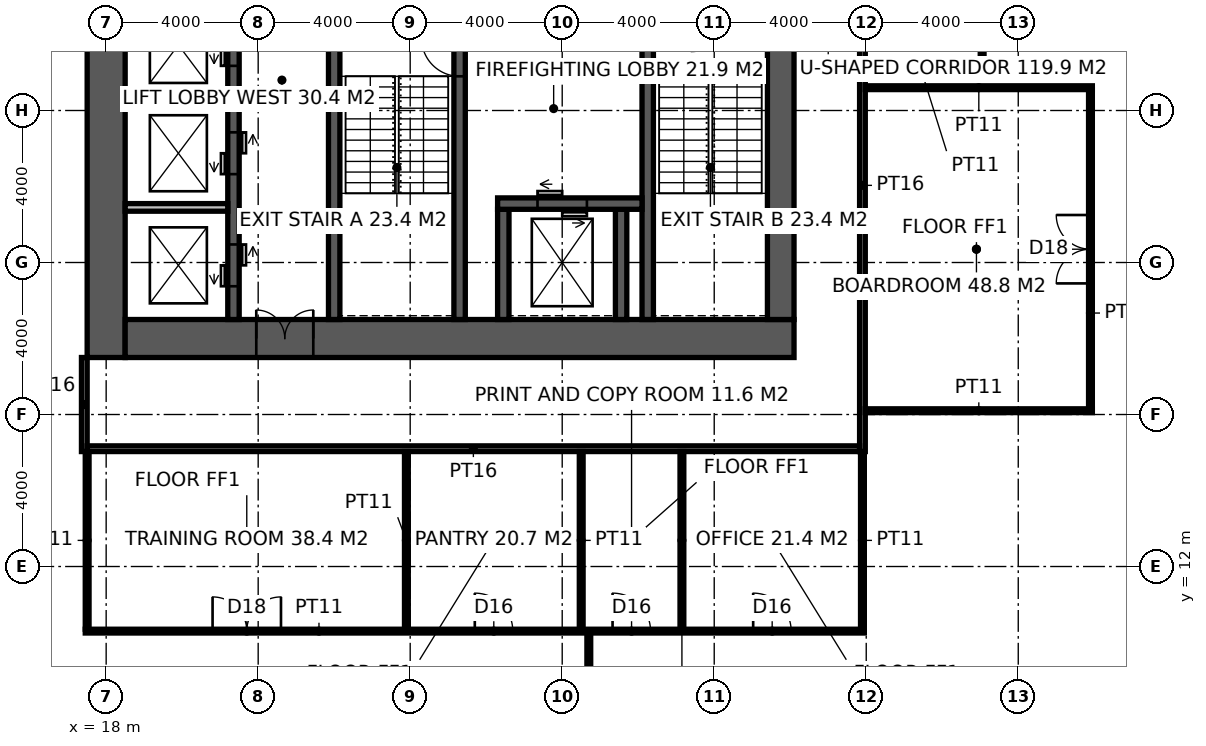
"""IFC4 building model, lengths in metres.
Left out: names, types, materials, properties, quantities, classifications, styles, units other than length and angle.
Written with IfcOpenShell. Run it as: python <this file> out.ifc"""

import sys

from ifc_helpers import new_model, si_unit, direction, frame, frame_2d, origin, place, context, subcontext, project, spatial, rectangle, extrude, element, fill, save


model = new_model("IFC4")
c1 = context("Model", 3, precision=1e-05, world=origin(), true_north=direction((0.0, 1.0)))
c2 = subcontext(c1, "Body", "Model", "MODEL_VIEW")
j1 = project(units=[si_unit("LENGTHUNIT", "METRE"), si_unit("PLANEANGLEUNIT", "RADIAN")], contexts=[c1])
p1 = place(None, origin())
s1 = spatial("IfcSite", under=j1, at=p1, CompositionType="ELEMENT")
p2 = place(p1, origin())
s2 = spatial("IfcBuilding", under=s1, at=p2, CompositionType="ELEMENT")
p3 = place(p2, frame((0.0, 0.0, 113.4)))
s3 = spatial("IfcBuildingStorey", under=s2, at=p3, CompositionType="ELEMENT", Elevation=113.4)
p4 = place(p3, frame((18.0, 17.5, -0.15), z_axis=(0.0, 0.0, 1.0), x_axis=(0.0, 1.0, 0.0)))
e1 = element("IfcWall", 1, at=p4, inside=s3, PredefinedType="SHEAR", context=c2, shape_type="SweptSolid", body=[
    extrude(rectangle(XDim=19.0, YDim=1.0, at=frame_2d((9.5, 0.0))), origin(), (0.0, 0.0, 1.0), 4.0),
])
p5 = place(p3, frame((18.5, 18.0, -0.15), z_axis=(0.0, 0.0, 1.0), x_axis=(1.0, 0.0, 0.0)))
e2 = element("IfcWall", 2, at=p5, inside=s3, PredefinedType="SHEAR", context=c2, shape_type="SweptSolid", body=[
    extrude(rectangle(XDim=17.6, YDim=1.0, at=frame_2d((8.8, 0.0))), origin(), (0.0, 0.0, 1.0), 4.0),
])
p6 = place(p5, frame((3.45, 0.0, 0.15)))
e3 = element("IfcOpeningElement", 3, at=p6, cuts=e2, PredefinedType="OPENING", context=c2, shape_type="SweptSolid", body=[
    extrude(rectangle(XDim=1.5, YDim=2.4, at=frame_2d((0.75, 1.2))), frame((0.0, 0.51, 0.0), z_axis=(0.0, -1.0, 0.0), x_axis=(1.0, 0.0, 0.0)), (0.0, 0.0, 1.0), 1.02),
])
p7 = place(p3, frame((35.75, 18.5, -0.15), z_axis=(0.0, 0.0, 1.0), x_axis=(0.0, 1.0, 0.0)))
e4 = element("IfcWall", 4, at=p7, inside=s3, PredefinedType="SHEAR", context=c2, shape_type="SweptSolid", body=[
    extrude(rectangle(XDim=17.0, YDim=0.7, at=frame_2d((8.5, 0.0))), origin(), (0.0, 0.0, 1.0), 4.0),
])
p8 = place(p7, frame((9.85, 0.0, 0.15)))
e5 = element("IfcOpeningElement", 5, at=p8, cuts=e4, PredefinedType="OPENING", context=c2, shape_type="SweptSolid", body=[
    extrude(rectangle(XDim=1.0, YDim=2.2, at=frame_2d((0.5, 1.1))), frame((0.0, 0.36, 0.0), z_axis=(0.0, -1.0, 0.0), x_axis=(1.0, 0.0, 0.0)), (0.0, 0.0, 1.0), 0.72),
])
p9 = place(p3, frame((24.0, 18.5, -0.15), z_axis=(0.0, 0.0, 1.0), x_axis=(0.0, 1.0, 0.0)))
e6 = element("IfcWall", 6, at=p9, inside=s3, PredefinedType="SHEAR", context=c2, shape_type="SweptSolid", body=[
    extrude(rectangle(XDim=17.0, YDim=0.3, at=frame_2d((8.5, 0.0))), origin(), (0.0, 0.0, 1.0), 4.0),
])
p10 = place(p9, frame((9.6, 0.0, 0.15)))
e7 = element("IfcOpeningElement", 7, at=p10, cuts=e6, PredefinedType="OPENING", context=c2, shape_type="SweptSolid", body=[
    extrude(rectangle(XDim=1.5, YDim=2.4, at=frame_2d((0.75, 1.2))), frame((0.0, 0.16, 0.0), z_axis=(0.0, -1.0, 0.0), x_axis=(1.0, 0.0, 0.0)), (0.0, 0.0, 1.0), 0.32),
])
p11 = place(p3, frame((27.3, 18.5, -0.15), z_axis=(0.0, 0.0, 1.0), x_axis=(0.0, 1.0, 0.0)))
e8 = element("IfcWall", 8, at=p11, inside=s3, PredefinedType="SHEAR", context=c2, shape_type="SweptSolid", body=[
    extrude(rectangle(XDim=7.9, YDim=0.3, at=frame_2d((3.95, 0.0))), origin(), (0.0, 0.0, 1.0), 4.0),
])
p12 = place(p11, frame((6.4, 0.0, 0.15)))
e9 = element("IfcOpeningElement", 9, at=p12, cuts=e8, PredefinedType="OPENING", context=c2, shape_type="SweptSolid", body=[
    extrude(rectangle(XDim=1.0, YDim=2.2, at=frame_2d((0.5, 1.1))), frame((0.0, 0.16, 0.0), z_axis=(0.0, -1.0, 0.0), x_axis=(1.0, 0.0, 0.0)), (0.0, 0.0, 1.0), 0.32),
])
p13 = place(p3, frame((32.25, 18.5, -0.15), z_axis=(0.0, 0.0, 1.0), x_axis=(0.0, 1.0, 0.0)))
e10 = element("IfcWall", 10, at=p13, inside=s3, PredefinedType="SHEAR", context=c2, shape_type="SweptSolid", body=[
    extrude(rectangle(XDim=7.9, YDim=0.3, at=frame_2d((3.95, 0.0))), origin(), (0.0, 0.0, 1.0), 4.0),
])
for number, where, z_axis, x_axis in (
    (11, (28.45, 18.5, -0.15), (0.0, 0.0, 1.0), (0.0, 1.0, 0.0)),
    (12, (31.55, 18.5, -0.15), (0.0, 0.0, 1.0), (0.0, 1.0, 0.0)),
):
    element("IfcWall", number, at=place(p3, frame(where, z_axis=z_axis, x_axis=x_axis)), inside=s3, PredefinedType="SHEAR", context=c2, shape_type="SweptSolid", body=[
        extrude(rectangle(XDim=2.9, YDim=0.3, at=frame_2d((1.45, 0.0))), origin(), (0.0, 0.0, 1.0), 4.0),
    ])
p14 = place(p3, frame((28.3, 21.55, -0.15), z_axis=(0.0, 0.0, 1.0), x_axis=(1.0, 0.0, 0.0)))
e13 = element("IfcWall", 13, at=p14, inside=s3, PredefinedType="SHEAR", context=c2, shape_type="SweptSolid", body=[
    extrude(rectangle(XDim=3.8, YDim=0.3, at=frame_2d((1.9, 0.0))), origin(), (0.0, 0.0, 1.0), 4.0),
])
p15 = place(p14, frame((1.05, 0.0, 0.15)))
e14 = element("IfcOpeningElement", 14, at=p15, cuts=e13, PredefinedType="OPENING", context=c2, shape_type="SweptSolid", body=[
    extrude(rectangle(XDim=1.3, YDim=2.4, at=frame_2d((0.65, 1.2))), frame((0.0, 0.16, 0.0), z_axis=(0.0, -1.0, 0.0), x_axis=(1.0, 0.0, 0.0)), (0.0, 0.0, 1.0), 0.32),
])
p16 = place(p3, frame((21.35, 18.5, -0.15), z_axis=(0.0, 0.0, 1.0), x_axis=(0.0, 1.0, 0.0)))
e15 = element("IfcWall", 15, at=p16, inside=s3, PredefinedType="SHEAR", context=c2, shape_type="SweptSolid", body=[
    extrude(rectangle(XDim=12.5, YDim=0.3, at=frame_2d((6.25, 0.0))), origin(), (0.0, 0.0, 1.0), 4.0),
])
p17 = place(p16, frame((0.875, 0.0, 0.15)))
e16 = element("IfcOpeningElement", 16, at=p17, cuts=e15, PredefinedType="OPENING", context=c2, shape_type="SweptSolid", body=[
    extrude(rectangle(XDim=1.1, YDim=2.2, at=frame_2d((0.55, 1.1))), frame((0.0, 0.16, 0.0), z_axis=(0.0, -1.0, 0.0), x_axis=(1.0, 0.0, 0.0)), (0.0, 0.0, 1.0), 0.32),
])
p18 = place(p16, frame((3.825, 0.0, 0.15)))
e17 = element("IfcOpeningElement", 17, at=p18, cuts=e15, PredefinedType="OPENING", context=c2, shape_type="SweptSolid", body=[
    extrude(rectangle(XDim=1.1, YDim=2.2, at=frame_2d((0.55, 1.1))), frame((0.0, 0.16, 0.0), z_axis=(0.0, -1.0, 0.0), x_axis=(1.0, 0.0, 0.0)), (0.0, 0.0, 1.0), 0.32),
])
p19 = place(p16, frame((6.675, 0.0, 0.15)))
e18 = element("IfcOpeningElement", 18, at=p19, cuts=e15, PredefinedType="OPENING", context=c2, shape_type="SweptSolid", body=[
    extrude(rectangle(XDim=1.1, YDim=2.2, at=frame_2d((0.55, 1.1))), frame((0.0, 0.16, 0.0), z_axis=(0.0, -1.0, 0.0), x_axis=(1.0, 0.0, 0.0)), (0.0, 0.0, 1.0), 0.32),
])
p20 = place(p16, frame((9.575, 0.0, 0.15)))
e19 = element("IfcOpeningElement", 19, at=p20, cuts=e15, PredefinedType="OPENING", context=c2, shape_type="SweptSolid", body=[
    extrude(rectangle(XDim=1.1, YDim=2.2, at=frame_2d((0.55, 1.1))), frame((0.0, 0.16, 0.0), z_axis=(0.0, -1.0, 0.0), x_axis=(1.0, 0.0, 0.0)), (0.0, 0.0, 1.0), 0.32),
])
for number, where, z_axis, x_axis in (
    (20, (18.5, 21.45, -0.15), (0.0, 0.0, 1.0), (1.0, 0.0, 0.0)),
    (21, (18.5, 24.3, -0.15), (0.0, 0.0, 1.0), (1.0, 0.0, 0.0)),
):
    element("IfcWall", number, at=place(p3, frame(where, z_axis=z_axis, x_axis=x_axis)), inside=s3, PredefinedType="SOLIDWALL", context=c2, shape_type="SweptSolid", body=[
        extrude(rectangle(XDim=2.7, YDim=0.2, at=frame_2d((1.35, 0.0))), origin(), (0.0, 0.0, 1.0), 4.0),
    ])
p21 = place(p3, frame((17.425, 15.025, 0.0), z_axis=(0.0, 0.0, 1.0), x_axis=(0.0, 1.0, 0.0)))
e22 = element("IfcWall", 22, at=p21, inside=s3, PredefinedType="PARTITIONING", context=c2, shape_type="SweptSolid", body=[
    extrude(rectangle(XDim=2.475, YDim=0.15, at=frame_2d((1.238, 0.0))), origin(), (0.0, 0.0, 1.0), 3.85),
])
p22 = place(p3, frame((37.9, 15.025, 0.0), z_axis=(0.0, 0.0, 1.0), x_axis=(0.0, 1.0, 0.0)))
e23 = element("IfcWall", 23, at=p22, inside=s3, PredefinedType="PARTITIONING", context=c2, shape_type="SweptSolid", body=[
    extrude(rectangle(XDim=23.35, YDim=0.15, at=frame_2d((11.675, 0.0))), origin(), (0.0, 0.0, 1.0), 2.95),
])
p23 = place(p22, frame((10.775, 0.0, 0.0)))
e24 = element("IfcOpeningElement", 24, at=p23, cuts=e23, PredefinedType="OPENING", context=c2, shape_type="SweptSolid", body=[
    extrude(rectangle(XDim=1.8, YDim=2.4, at=frame_2d((0.9, 1.2))), frame((0.0, 0.085, 0.0), z_axis=(0.0, -1.0, 0.0), x_axis=(1.0, 0.0, 0.0)), (0.0, 0.0, 1.0), 0.17),
])
p24 = place(p3, frame((17.5, 15.1, 0.0), z_axis=(0.0, 0.0, 1.0), x_axis=(1.0, 0.0, 0.0)))
e25 = element("IfcWall", 25, at=p24, inside=s3, PredefinedType="PARTITIONING", context=c2, shape_type="SweptSolid", body=[
    extrude(rectangle(XDim=20.325, YDim=0.15, at=frame_2d((10.163, 0.0))), origin(), (0.0, 0.0, 1.0), 3.85),
])
p25 = place(p3, frame((17.45, 10.3, 0.0), z_axis=(0.0, 0.0, 1.0), x_axis=(1.0, 0.0, 0.0)))
e26 = element("IfcWall", 26, at=p25, inside=s3, PredefinedType="PARTITIONING", context=c2, shape_type="SweptSolid", body=[
    extrude(rectangle(XDim=20.5, YDim=0.1, at=frame_2d((10.25, 0.0))), origin(), (0.0, 0.0, 1.0), 3.85),
])
p26 = place(p25, frame((3.35, 0.0, 0.0)))
e27 = element("IfcOpeningElement", 27, at=p26, cuts=e26, PredefinedType="OPENING", context=c2, shape_type="SweptSolid", body=[
    extrude(rectangle(XDim=1.8, YDim=2.4, at=frame_2d((0.9, 1.2))), frame((0.0, 0.06, 0.0), z_axis=(0.0, -1.0, 0.0), x_axis=(1.0, 0.0, 0.0)), (0.0, 0.0, 1.0), 0.12),
])
p27 = place(p25, frame((10.25, 0.0, 0.0)))
e28 = element("IfcOpeningElement", 28, at=p27, cuts=e26, PredefinedType="OPENING", context=c2, shape_type="SweptSolid", body=[
    extrude(rectangle(XDim=1.0, YDim=2.2, at=frame_2d((0.5, 1.1))), frame((0.0, 0.06, 0.0), z_axis=(0.0, -1.0, 0.0), x_axis=(1.0, 0.0, 0.0)), (0.0, 0.0, 1.0), 0.12),
])
p28 = place(p25, frame((13.875, 0.0, 0.0)))
e29 = element("IfcOpeningElement", 29, at=p28, cuts=e26, PredefinedType="OPENING", context=c2, shape_type="SweptSolid", body=[
    extrude(rectangle(XDim=1.0, YDim=2.2, at=frame_2d((0.5, 1.1))), frame((0.0, 0.06, 0.0), z_axis=(0.0, -1.0, 0.0), x_axis=(1.0, 0.0, 0.0)), (0.0, 0.0, 1.0), 0.12),
])
p29 = place(p25, frame((17.575, 0.0, 0.0)))
e30 = element("IfcOpeningElement", 30, at=p29, cuts=e26, PredefinedType="OPENING", context=c2, shape_type="SweptSolid", body=[
    extrude(rectangle(XDim=1.0, YDim=2.2, at=frame_2d((0.5, 1.1))), frame((0.0, 0.06, 0.0), z_axis=(0.0, -1.0, 0.0), x_axis=(1.0, 0.0, 0.0)), (0.0, 0.0, 1.0), 0.12),
])
for number, where, z_axis, x_axis in (
    (31, (37.975, 16.1, 0.0), (0.0, 0.0, 1.0), (1.0, 0.0, 0.0)),
    (32, (37.975, 24.6, 0.0), (0.0, 0.0, 1.0), (1.0, 0.0, 0.0)),
):
    element("IfcWall", number, at=place(p3, frame(where, z_axis=z_axis, x_axis=x_axis)), inside=s3, PredefinedType="PARTITIONING", context=c2, shape_type="SweptSolid", body=[
        extrude(rectangle(XDim=5.975, YDim=0.1, at=frame_2d((2.987, 0.0))), origin(), (0.0, 0.0, 1.0), 3.85),
    ])
p30 = place(p3, frame((17.5, 10.35, 0.0), z_axis=(0.0, 0.0, 1.0), x_axis=(0.0, 1.0, 0.0)))
e33 = element("IfcWall", 33, at=p30, inside=s3, PredefinedType="PARTITIONING", context=c2, shape_type="SweptSolid", body=[
    extrude(rectangle(XDim=4.675, YDim=0.1, at=frame_2d((2.337, 0.0))), origin(), (0.0, 0.0, 1.0), 3.85),
])
p31 = place(p3, frame((25.9, 10.35, 0.0), z_axis=(0.0, 0.0, 1.0), x_axis=(0.0, 1.0, 0.0)))
e34 = element("IfcWall", 34, at=p31, inside=s3, PredefinedType="PARTITIONING", context=c2, shape_type="SweptSolid", body=[
    extrude(rectangle(XDim=4.675, YDim=0.1, at=frame_2d((2.337, 0.0))), origin(), (0.0, 0.0, 1.0), 2.95),
])
for number, where, z_axis, x_axis in (
    (35, (30.5, 10.35, 0.0), (0.0, 0.0, 1.0), (0.0, 1.0, 0.0)),
    (36, (33.15, 10.35, 0.0), (0.0, 0.0, 1.0), (0.0, 1.0, 0.0)),
):
    element("IfcWall", number, at=place(p3, frame(where, z_axis=z_axis, x_axis=x_axis)), inside=s3, PredefinedType="PARTITIONING", context=c2, shape_type="SweptSolid", body=[
        extrude(rectangle(XDim=4.675, YDim=0.1, at=frame_2d((2.337, 0.0))), origin(), (0.0, 0.0, 1.0), 3.85),
    ])
p32 = place(p3, frame((37.9, 10.35, 0.0), z_axis=(0.0, 0.0, 1.0), x_axis=(0.0, 1.0, 0.0)))
e37 = element("IfcWall", 37, at=p32, inside=s3, PredefinedType="PARTITIONING", context=c2, shape_type="SweptSolid", body=[
    extrude(rectangle(XDim=4.675, YDim=0.1, at=frame_2d((2.337, 0.0))), origin(), (0.0, 0.0, 1.0), 2.95),
])
p33 = place(p3, frame((43.9, 16.15, 0.0), z_axis=(0.0, 0.0, 1.0), x_axis=(0.0, 1.0, 0.0)))
e38 = element("IfcWall", 38, at=p33, inside=s3, PredefinedType="PARTITIONING", context=c2, shape_type="SweptSolid", body=[
    extrude(rectangle(XDim=8.4, YDim=0.1, at=frame_2d((4.2, 0.0))), origin(), (0.0, 0.0, 1.0), 3.85),
])
p34 = place(p33, frame((3.3, 0.0, 0.0)))
e39 = element("IfcOpeningElement", 39, at=p34, cuts=e38, PredefinedType="OPENING", context=c2, shape_type="SweptSolid", body=[
    extrude(rectangle(XDim=1.8, YDim=2.4, at=frame_2d((0.9, 1.2))), frame((0.0, 0.06, 0.0), z_axis=(0.0, -1.0, 0.0), x_axis=(1.0, 0.0, 0.0)), (0.0, 0.0, 1.0), 0.12),
])
p35 = place(p3, frame((30.7, 4.3, 0.0), z_axis=(0.0, 0.0, 1.0), x_axis=(0.0, 1.0, 0.0)))
e40 = element("IfcWall", 40, at=p35, inside=s3, PredefinedType="PARTITIONING", context=c2, shape_type="SweptSolid", body=[
    extrude(rectangle(XDim=5.95, YDim=0.1, at=frame_2d((2.975, 0.0))), origin(), (0.0, 0.0, 1.0), 3.85),
])
p36 = place(p3, frame((37.9, 24.975, 0.0), z_axis=(0.0, 0.0, 1.0), x_axis=(1.0, 0.0, 0.0)))
e41 = element("IfcWall", 41, at=p36, inside=s3, PredefinedType="PARTITIONING", context=c2, shape_type="SweptSolid", body=[
    extrude(rectangle(XDim=3.15, YDim=0.1, at=frame_2d((1.575, 0.0))), origin(), (0.0, 0.0, 1.0), 3.85),
])
p37 = place(p3, frame((41.05, 24.975, 0.0), z_axis=(0.0, 0.0, 1.0), x_axis=(0.0, 1.0, 0.0)))
e42 = element("IfcWall", 42, at=p37, inside=s3, PredefinedType="PARTITIONING", context=c2, shape_type="SweptSolid", body=[
    extrude(rectangle(XDim=3.45, YDim=0.1, at=frame_2d((1.725, 0.0))), origin(), (0.0, 0.0, 1.0), 3.85),
])
p38 = place(p37, frame((1.225, 0.0, 0.0)))
e43 = element("IfcOpeningElement", 43, at=p38, cuts=e42, PredefinedType="OPENING", context=c2, shape_type="SweptSolid", body=[
    extrude(rectangle(XDim=1.0, YDim=2.2, at=frame_2d((0.5, 1.1))), frame((0.0, 0.06, 0.0), z_axis=(0.0, -1.0, 0.0), x_axis=(1.0, 0.0, 0.0)), (0.0, 0.0, 1.0), 0.12),
])
p39 = place(p12, origin())
e44 = element("IfcDoor", 44, at=p39, inside=s3, OperationType="SINGLE_SWING_RIGHT", PredefinedType="DOOR", context=c2, shape_type="SweptSolid", body=[
    extrude(rectangle(XDim=1.0, YDim=2.2, at=frame_2d((0.5, 1.1))), frame((0.0, 0.025, 0.0), z_axis=(0.0, -1.0, 0.0), x_axis=(1.0, 0.0, 0.0)), (0.0, 0.0, 1.0), 0.05),
])
fill(e9, e44)
p40 = place(p6, origin())
e45 = element("IfcDoor", 45, at=p40, inside=s3, OperationType="DOUBLE_DOOR_DOUBLE_SWING", PredefinedType="DOOR", context=c2, shape_type="SweptSolid", body=[
    extrude(rectangle(XDim=1.5, YDim=2.4, at=frame_2d((0.75, 1.2))), frame((0.0, 0.025, 0.0), z_axis=(0.0, -1.0, 0.0), x_axis=(1.0, 0.0, 0.0)), (0.0, 0.0, 1.0), 0.05),
])
fill(e3, e45)
p41 = place(p26, origin())
e46 = element("IfcDoor", 46, at=p41, inside=s3, OperationType="DOUBLE_DOOR_DOUBLE_SWING", PredefinedType="DOOR", context=c2, shape_type="SweptSolid", body=[
    extrude(rectangle(XDim=1.8, YDim=2.4, at=frame_2d((0.9, 1.2))), frame((0.0, 0.025, 0.0), z_axis=(0.0, -1.0, 0.0), x_axis=(1.0, 0.0, 0.0)), (0.0, 0.0, 1.0), 0.05),
])
fill(e27, e46)
p42 = place(p27, origin())
e47 = element("IfcDoor", 47, at=p42, inside=s3, OperationType="SINGLE_SWING_LEFT", PredefinedType="DOOR", context=c2, shape_type="SweptSolid", body=[
    extrude(rectangle(XDim=1.0, YDim=2.2, at=frame_2d((0.5, 1.1))), frame((0.0, 0.025, 0.0), z_axis=(0.0, -1.0, 0.0), x_axis=(1.0, 0.0, 0.0)), (0.0, 0.0, 1.0), 0.05),
])
fill(e28, e47)
p43 = place(p28, origin())
e48 = element("IfcDoor", 48, at=p43, inside=s3, OperationType="SINGLE_SWING_LEFT", PredefinedType="DOOR", context=c2, shape_type="SweptSolid", body=[
    extrude(rectangle(XDim=1.0, YDim=2.2, at=frame_2d((0.5, 1.1))), frame((0.0, 0.025, 0.0), z_axis=(0.0, -1.0, 0.0), x_axis=(1.0, 0.0, 0.0)), (0.0, 0.0, 1.0), 0.05),
])
fill(e29, e48)
p44 = place(p29, origin())
e49 = element("IfcDoor", 49, at=p44, inside=s3, OperationType="SINGLE_SWING_LEFT", PredefinedType="DOOR", context=c2, shape_type="SweptSolid", body=[
    extrude(rectangle(XDim=1.0, YDim=2.2, at=frame_2d((0.5, 1.1))), frame((0.0, 0.025, 0.0), z_axis=(0.0, -1.0, 0.0), x_axis=(1.0, 0.0, 0.0)), (0.0, 0.0, 1.0), 0.05),
])
fill(e30, e49)
p45 = place(p34, origin())
e50 = element("IfcDoor", 50, at=p45, inside=s3, OperationType="DOUBLE_DOOR_DOUBLE_SWING", PredefinedType="DOOR", context=c2, shape_type="SweptSolid", body=[
    extrude(rectangle(XDim=1.8, YDim=2.4, at=frame_2d((0.9, 1.2))), frame((0.0, 0.025, 0.0), z_axis=(0.0, -1.0, 0.0), x_axis=(1.0, 0.0, 0.0)), (0.0, 0.0, 1.0), 0.05),
])
fill(e39, e50)
p46 = place(p15, origin())
e51 = element("IfcDoor", 51, at=p46, inside=s3, OperationType="DOUBLE_DOOR_SLIDING", PredefinedType="DOOR", context=c2, shape_type="SweptSolid", body=[
    extrude(rectangle(XDim=1.3, YDim=2.4, at=frame_2d((0.65, 1.2))), frame((0.0, 0.025, 0.0), z_axis=(0.0, -1.0, 0.0), x_axis=(1.0, 0.0, 0.0)), (0.0, 0.0, 1.0), 0.05),
])
fill(e14, e51)
p47 = place(p17, origin())
e52 = element("IfcDoor", 52, at=p47, inside=s3, OperationType="DOUBLE_DOOR_SLIDING", PredefinedType="DOOR", context=c2, shape_type="SweptSolid", body=[
    extrude(rectangle(XDim=1.1, YDim=2.2, at=frame_2d((0.55, 1.1))), frame((0.0, 0.025, 0.0), z_axis=(0.0, -1.0, 0.0), x_axis=(1.0, 0.0, 0.0)), (0.0, 0.0, 1.0), 0.05),
])
fill(e16, e52)
p48 = place(p18, origin())
e53 = element("IfcDoor", 53, at=p48, inside=s3, OperationType="DOUBLE_DOOR_SLIDING", PredefinedType="DOOR", context=c2, shape_type="SweptSolid", body=[
    extrude(rectangle(XDim=1.1, YDim=2.2, at=frame_2d((0.55, 1.1))), frame((0.0, 0.025, 0.0), z_axis=(0.0, -1.0, 0.0), x_axis=(1.0, 0.0, 0.0)), (0.0, 0.0, 1.0), 0.05),
])
fill(e17, e53)
p49 = place(p19, origin())
e54 = element("IfcDoor", 54, at=p49, inside=s3, OperationType="DOUBLE_DOOR_SLIDING", PredefinedType="DOOR", context=c2, shape_type="SweptSolid", body=[
    extrude(rectangle(XDim=1.1, YDim=2.2, at=frame_2d((0.55, 1.1))), frame((0.0, 0.025, 0.0), z_axis=(0.0, -1.0, 0.0), x_axis=(1.0, 0.0, 0.0)), (0.0, 0.0, 1.0), 0.05),
])
fill(e18, e54)
save(model, sys.argv[1])
